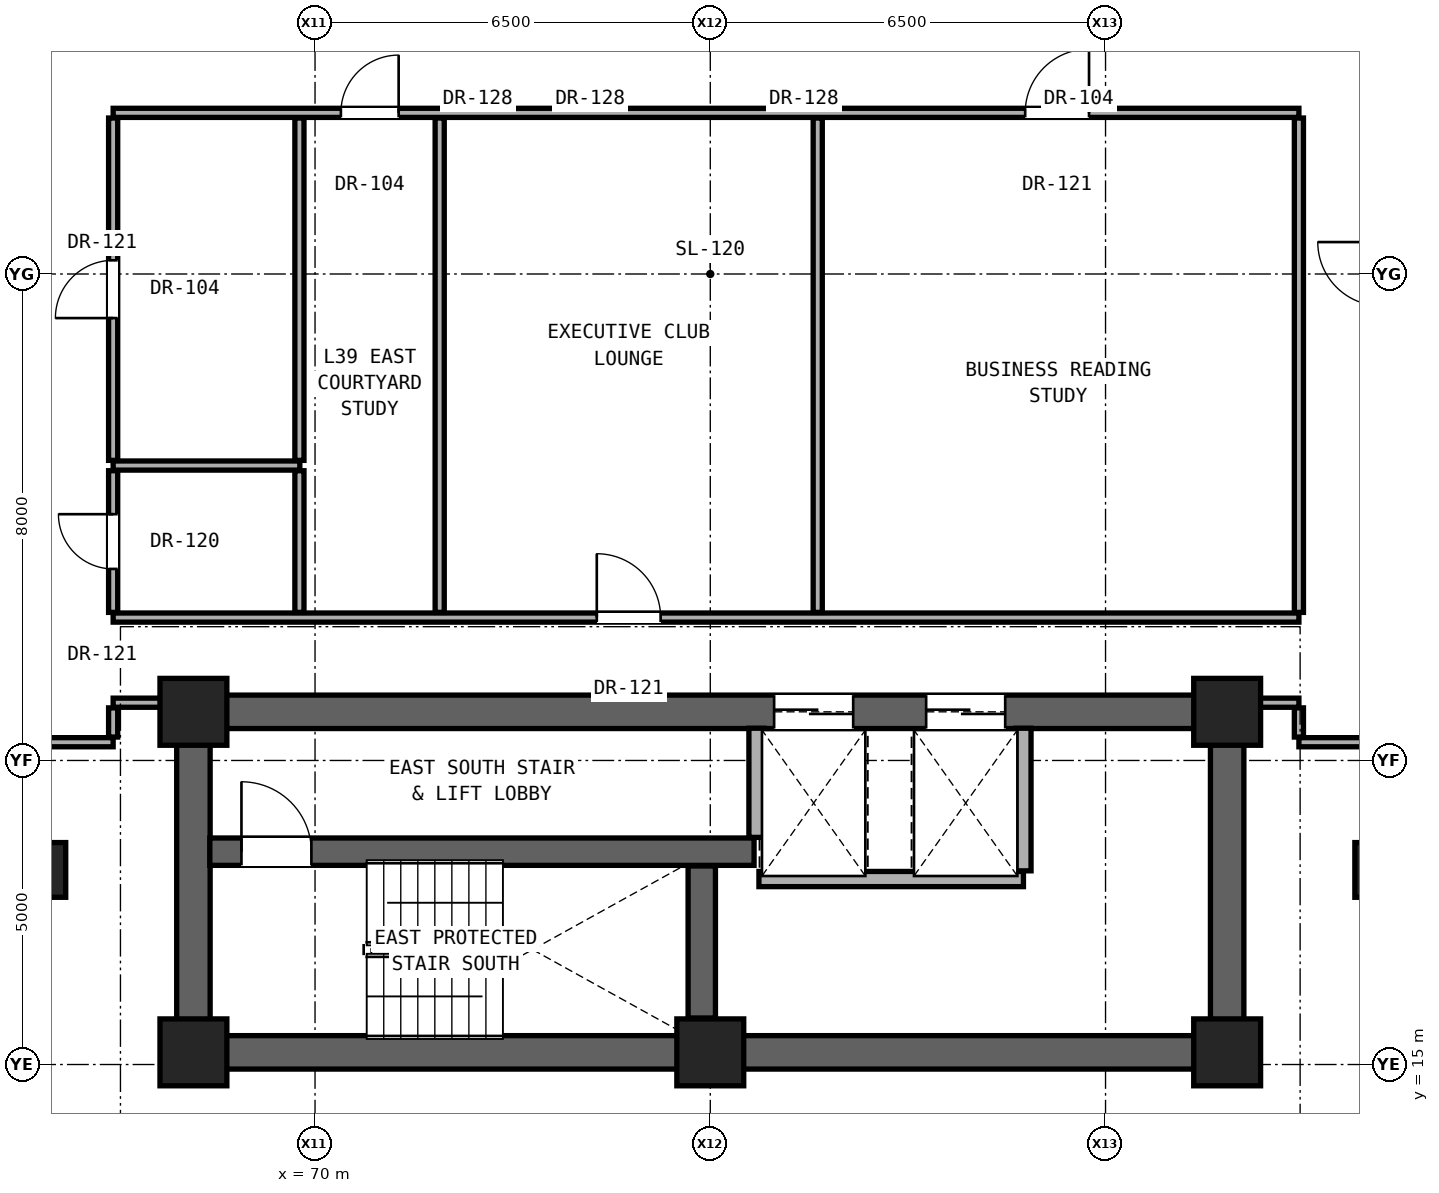
"""IFC4 building model, lengths in metres.
Left out: names, types, materials, properties, quantities, classifications, styles, units other than length and angle.
Written with IfcOpenShell. Run it as: python <this file> out.ifc"""

import sys

from ifc_helpers import new_model, si_unit, direction, frame, frame_2d, origin, origin_2d, place, context, subcontext, project, spatial, rectangle, extrude, element, fill, save


model = new_model("IFC4")
c1 = context("Model", 3, precision=1e-05, world=origin(), true_north=direction((0.0, 1.0)))
c2 = subcontext(c1, "Body", "Model", "MODEL_VIEW")
j1 = project(units=[si_unit("LENGTHUNIT", "METRE"), si_unit("PLANEANGLEUNIT", "RADIAN")], contexts=[c1])
p1 = place(None, origin())
s1 = spatial("IfcSite", under=j1, at=p1, CompositionType="ELEMENT")
p2 = place(p1, origin())
s2 = spatial("IfcBuilding", under=s1, at=p2, CompositionType="ELEMENT")
p3 = place(p2, frame((0.0, 0.0, 137.9)))
s3 = spatial("IfcBuildingStorey", under=s2, at=p3, CompositionType="ELEMENT", Elevation=137.9)
for number, where, z_axis, x_axis in (
    (1, (68.0, 15.2, 0.0), (0.0, 0.0, 1.0), (1.0, 0.0, 0.0)),
    (2, (76.5, 15.2, 0.0), (0.0, 0.0, 1.0), (1.0, 0.0, 0.0)),
    (3, (85.0, 15.2, 0.0), (0.0, 0.0, 1.0), (1.0, 0.0, 0.0)),
    (4, (68.0, 20.8, 0.0), (0.0, 0.0, 1.0), (1.0, 0.0, 0.0)),
    (5, (85.0, 20.8, 0.0), (0.0, 0.0, 1.0), (1.0, 0.0, 0.0)),
):
    element("IfcColumn", number, at=place(p3, frame(where, z_axis=z_axis, x_axis=x_axis)), inside=s3, PredefinedType="COLUMN", context=c2, shape_type="SweptSolid", body=[
        extrude(rectangle(XDim=1.1, YDim=1.1, at=origin_2d()), origin(), (0.0, 0.0, 1.0), 3.3),
    ])
for number, where, z_axis, x_axis in (
    (6, (65.6, 18.2, 0.0), (0.0, 0.0, 1.0), (1.0, 0.0, 0.0)),
    (7, (87.4, 18.2, 0.0), (0.0, 0.0, 1.0), (1.0, 0.0, 0.0)),
):
    element("IfcColumn", number, at=place(p3, frame(where, z_axis=z_axis, x_axis=x_axis)), inside=s3, PredefinedType="PILASTER", context=c2, shape_type="SweptSolid", body=[
        extrude(rectangle(XDim=0.6, YDim=0.9, at=origin_2d()), origin(), (0.0, 0.0, 1.0), 3.3),
    ])
p4 = place(p3, frame((68.0, 15.2, 0.0), z_axis=(0.0, 0.0, 1.0), x_axis=(1.0, 0.0, 0.0)))
e8 = element("IfcWall", 8, at=p4, inside=s3, PredefinedType="SHEAR", context=c2, shape_type="SweptSolid", body=[
    extrude(rectangle(XDim=17.0, YDim=0.55, at=frame_2d((8.5, 0.0))), origin(), (0.0, 0.0, 1.0), 3.08),
])
for number, where, z_axis, x_axis in (
    (9, (68.0, 15.2, 0.0), (0.0, 0.0, 1.0), (0.0, 1.0, 0.0)),
    (10, (85.0, 15.2, 0.0), (0.0, 0.0, 1.0), (0.0, 1.0, 0.0)),
):
    element("IfcWall", number, at=place(p3, frame(where, z_axis=z_axis, x_axis=x_axis)), inside=s3, PredefinedType="SHEAR", context=c2, shape_type="SweptSolid", body=[
        extrude(rectangle(XDim=5.6, YDim=0.55, at=frame_2d((2.8, 0.0))), origin(), (0.0, 0.0, 1.0), 3.08),
    ])
p5 = place(p3, frame((68.0, 20.8, 0.0), z_axis=(0.0, 0.0, 1.0), x_axis=(1.0, 0.0, 0.0)))
e11 = element("IfcWall", 11, at=p5, inside=s3, PredefinedType="SHEAR", context=c2, shape_type="SweptSolid", body=[
    extrude(rectangle(XDim=17.0, YDim=0.55, at=frame_2d((8.5, 0.0))), origin(), (0.0, 0.0, 1.0), 3.08),
])
p6 = place(p5, frame((9.55, 0.0, 0.0)))
e12 = element("IfcOpeningElement", 12, at=p6, cuts=e11, PredefinedType="OPENING", context=c2, shape_type="SweptSolid", body=[
    extrude(rectangle(XDim=1.3, YDim=2.3, at=frame_2d((0.65, 1.15))), frame((0.0, 0.285, 0.0), z_axis=(0.0, -1.0, 0.0), x_axis=(1.0, 0.0, 0.0)), (0.0, 0.0, 1.0), 0.57),
])
p7 = place(p5, frame((12.05, 0.0, 0.0)))
e13 = element("IfcOpeningElement", 13, at=p7, cuts=e11, PredefinedType="OPENING", context=c2, shape_type="SweptSolid", body=[
    extrude(rectangle(XDim=1.3, YDim=2.3, at=frame_2d((0.65, 1.15))), frame((0.0, 0.285, 0.0), z_axis=(0.0, -1.0, 0.0), x_axis=(1.0, 0.0, 0.0)), (0.0, 0.0, 1.0), 0.57),
])
p8 = place(p3, frame((77.3, 18.05, 0.0), z_axis=(0.0, 0.0, 1.0), x_axis=(1.0, 0.0, 0.0)))
e14 = element("IfcWall", 14, at=p8, inside=s3, PredefinedType="SOLIDWALL", context=c2, shape_type="SweptSolid", body=[
    extrude(rectangle(XDim=4.35, YDim=0.25, at=frame_2d((2.175, 0.0))), origin(), (0.0, 0.0, 1.0), 3.08),
])
p9 = place(p3, frame((68.27, 18.5, 0.0), z_axis=(0.0, 0.0, 1.0), x_axis=(1.0, 0.0, 0.0)))
e15 = element("IfcWall", 15, at=p9, inside=s3, PredefinedType="SHEAR", context=c2, shape_type="SweptSolid", body=[
    extrude(rectangle(XDim=8.95, YDim=0.45, at=frame_2d((4.475, 0.0))), origin(), (0.0, 0.0, 1.0), 3.08),
])
p10 = place(p9, frame((0.52, 0.0, 0.0)))
e16 = element("IfcOpeningElement", 16, at=p10, cuts=e15, PredefinedType="OPENING", context=c2, shape_type="SweptSolid", body=[
    extrude(rectangle(XDim=1.15, YDim=2.2, at=frame_2d((0.575, 1.1))), frame((0.0, 0.235, 0.0), z_axis=(0.0, -1.0, 0.0), x_axis=(1.0, 0.0, 0.0)), (0.0, 0.0, 1.0), 0.47),
])
p11 = place(p3, frame((65.32, 20.3, 0.0), z_axis=(0.0, 0.0, 1.0), x_axis=(1.0, 0.0, 0.0)))
e17 = element("IfcWall", 17, at=p11, inside=s3, PredefinedType="PARTITIONING", context=c2, shape_type="SweptSolid", body=[
    extrude(rectangle(XDim=1.36, YDim=0.15, at=frame_2d((0.68, 0.0))), origin(), (0.0, 0.0, 1.0), 3.08),
])
p12 = place(p3, frame((86.18, 20.3, 0.0), z_axis=(0.0, 0.0, 1.0), x_axis=(1.0, 0.0, 0.0)))
e18 = element("IfcWall", 18, at=p12, inside=s3, PredefinedType="PARTITIONING", context=c2, shape_type="SweptSolid", body=[
    extrude(rectangle(XDim=1.36, YDim=0.15, at=frame_2d((0.68, 0.0))), origin(), (0.0, 0.0, 1.0), 3.08),
])
p13 = place(p3, frame((66.68, 20.95, 0.0), z_axis=(0.0, 0.0, 1.0), x_axis=(1.0, 0.0, 0.0)))
e19 = element("IfcWall", 19, at=p13, inside=s3, PredefinedType="PARTITIONING", context=c2, shape_type="SweptSolid", body=[
    extrude(rectangle(XDim=1.05, YDim=0.15, at=frame_2d((0.525, 0.0))), origin(), (0.0, 0.0, 1.0), 2.472),
])
p14 = place(p3, frame((85.27, 20.95, 0.0), z_axis=(0.0, 0.0, 1.0), x_axis=(1.0, 0.0, 0.0)))
e20 = element("IfcWall", 20, at=p14, inside=s3, PredefinedType="PARTITIONING", context=c2, shape_type="SweptSolid", body=[
    extrude(rectangle(XDim=0.91, YDim=0.15, at=frame_2d((0.455, 0.0))), origin(), (0.0, 0.0, 1.0), 2.472),
])
p15 = place(p3, frame((66.68, 22.35, 0.0), z_axis=(0.0, 0.0, 1.0), x_axis=(1.0, 0.0, 0.0)))
e21 = element("IfcWall", 21, at=p15, inside=s3, PredefinedType="PARTITIONING", context=c2, shape_type="SweptSolid", body=[
    extrude(rectangle(XDim=19.5, YDim=0.15, at=frame_2d((9.75, 0.0))), origin(), (0.0, 0.0, 1.0), 2.216),
])
p16 = place(p15, frame((7.954, 0.0, 0.0)))
e22 = element("IfcOpeningElement", 22, at=p16, cuts=e21, PredefinedType="OPENING", context=c2, shape_type="SweptSolid", body=[
    extrude(rectangle(XDim=1.05, YDim=2.2, at=frame_2d((0.525, 1.1))), frame((0.0, 0.085, 0.0), z_axis=(0.0, -1.0, 0.0), x_axis=(1.0, 0.0, 0.0)), (0.0, 0.0, 1.0), 0.17),
])
p17 = place(p3, frame((66.68, 24.85, 0.0), z_axis=(0.0, 0.0, 1.0), x_axis=(1.0, 0.0, 0.0)))
e23 = element("IfcWall", 23, at=p17, inside=s3, PredefinedType="PARTITIONING", context=c2, shape_type="SweptSolid", body=[
    extrude(rectangle(XDim=3.07, YDim=0.15, at=frame_2d((1.535, 0.0))), origin(), (0.0, 0.0, 1.0), 2.216),
])
p18 = place(p3, frame((66.68, 30.65, 0.0), z_axis=(0.0, 0.0, 1.0), x_axis=(1.0, 0.0, 0.0)))
e24 = element("IfcWall", 24, at=p18, inside=s3, PredefinedType="PARTITIONING", context=c2, shape_type="SweptSolid", body=[
    extrude(rectangle(XDim=19.5, YDim=0.15, at=frame_2d((9.75, 0.0))), origin(), (0.0, 0.0, 1.0), 2.216),
])
p19 = place(p18, frame((3.745, 0.0, 0.0)))
e25 = element("IfcOpeningElement", 25, at=p19, cuts=e24, PredefinedType="OPENING", context=c2, shape_type="SweptSolid", body=[
    extrude(rectangle(XDim=0.95, YDim=2.15, at=frame_2d((0.475, 1.075))), frame((0.0, 0.085, 0.0), z_axis=(0.0, -1.0, 0.0), x_axis=(1.0, 0.0, 0.0)), (0.0, 0.0, 1.0), 0.17),
])
p20 = place(p18, frame((14.999, 0.0, 0.0)))
e26 = element("IfcOpeningElement", 26, at=p20, cuts=e24, PredefinedType="OPENING", context=c2, shape_type="SweptSolid", body=[
    extrude(rectangle(XDim=1.05, YDim=2.2, at=frame_2d((0.525, 1.1))), frame((0.0, 0.085, 0.0), z_axis=(0.0, -1.0, 0.0), x_axis=(1.0, 0.0, 0.0)), (0.0, 0.0, 1.0), 0.17),
])
p21 = place(p3, frame((66.68, 20.385, 0.0), z_axis=(0.0, 0.0, 1.0), x_axis=(0.0, 1.0, 0.0)))
e27 = element("IfcWall", 27, at=p21, inside=s3, PredefinedType="PARTITIONING", context=c2, shape_type="SweptSolid", body=[
    extrude(rectangle(XDim=0.48, YDim=0.15, at=frame_2d((0.24, 0.0))), origin(), (0.0, 0.0, 1.0), 2.472),
])
p22 = place(p3, frame((66.68, 22.435, 0.0), z_axis=(0.0, 0.0, 1.0), x_axis=(0.0, 1.0, 0.0)))
e28 = element("IfcWall", 28, at=p22, inside=s3, PredefinedType="PARTITIONING", context=c2, shape_type="SweptSolid", body=[
    extrude(rectangle(XDim=2.33, YDim=0.15, at=frame_2d((1.165, 0.0))), origin(), (0.0, 0.0, 1.0), 3.08),
])
p23 = place(p22, frame((0.715, 0.0, 0.0)))
e29 = element("IfcOpeningElement", 29, at=p23, cuts=e28, PredefinedType="OPENING", context=c2, shape_type="SweptSolid", body=[
    extrude(rectangle(XDim=0.9, YDim=2.1, at=frame_2d((0.45, 1.05))), frame((0.0, 0.085, 0.0), z_axis=(0.0, -1.0, 0.0), x_axis=(1.0, 0.0, 0.0)), (0.0, 0.0, 1.0), 0.17),
])
p24 = place(p3, frame((66.68, 24.935, 0.0), z_axis=(0.0, 0.0, 1.0), x_axis=(0.0, 1.0, 0.0)))
e30 = element("IfcWall", 30, at=p24, inside=s3, PredefinedType="PARTITIONING", context=c2, shape_type="SweptSolid", body=[
    extrude(rectangle(XDim=5.63, YDim=0.15, at=frame_2d((2.815, 0.0))), origin(), (0.0, 0.0, 1.0), 2.376),
])
p25 = place(p24, frame((2.34, 0.0, 0.0)))
e31 = element("IfcOpeningElement", 31, at=p25, cuts=e30, PredefinedType="OPENING", context=c2, shape_type="SweptSolid", body=[
    extrude(rectangle(XDim=0.95, YDim=2.15, at=frame_2d((0.475, 1.075))), frame((0.0, 0.085, 0.0), z_axis=(0.0, -1.0, 0.0), x_axis=(1.0, 0.0, 0.0)), (0.0, 0.0, 1.0), 0.17),
])
p26 = place(p3, frame((69.743, 22.435, 0.0), z_axis=(0.0, 0.0, 1.0), x_axis=(0.0, 1.0, 0.0)))
e32 = element("IfcWall", 32, at=p26, inside=s3, PredefinedType="PARTITIONING", context=c2, shape_type="SweptSolid", body=[
    extrude(rectangle(XDim=2.33, YDim=0.15, at=frame_2d((1.165, 0.0))), origin(), (0.0, 0.0, 1.0), 3.08),
])
p27 = place(p3, frame((69.743, 24.935, 0.0), z_axis=(0.0, 0.0, 1.0), x_axis=(0.0, 1.0, 0.0)))
e33 = element("IfcWall", 33, at=p27, inside=s3, PredefinedType="PARTITIONING", context=c2, shape_type="SweptSolid", body=[
    extrude(rectangle(XDim=5.63, YDim=0.15, at=frame_2d((2.815, 0.0))), origin(), (0.0, 0.0, 1.0), 2.216),
])
p28 = place(p3, frame((72.05, 22.435, 0.0), z_axis=(0.0, 0.0, 1.0), x_axis=(0.0, 1.0, 0.0)))
e34 = element("IfcWall", 34, at=p28, inside=s3, PredefinedType="PARTITIONING", context=c2, shape_type="SweptSolid", body=[
    extrude(rectangle(XDim=8.13, YDim=0.15, at=frame_2d((4.065, 0.0))), origin(), (0.0, 0.0, 1.0), 2.216),
])
p29 = place(p3, frame((76.36, 15.765, 0.0), z_axis=(0.0, 0.0, 1.0), x_axis=(0.0, 1.0, 0.0)))
e35 = element("IfcWall", 35, at=p29, inside=s3, PredefinedType="SHEAR", context=c2, shape_type="SweptSolid", body=[
    extrude(rectangle(XDim=2.5, YDim=0.45, at=frame_2d((1.25, 0.0))), origin(), (0.0, 0.0, 1.0), 3.08),
])
p30 = place(p3, frame((77.26, 18.735, 0.0), z_axis=(0.0, 0.0, 1.0), x_axis=(0.0, 1.0, 0.0)))
e36 = element("IfcWall", 36, at=p30, inside=s3, PredefinedType="SOLIDWALL", context=c2, shape_type="SweptSolid", body=[
    extrude(rectangle(XDim=1.795, YDim=0.25, at=frame_2d((0.897, 0.0))), origin(), (0.0, 0.0, 1.0), 3.08),
])
p31 = place(p3, frame((78.267, 22.435, 0.0), z_axis=(0.0, 0.0, 1.0), x_axis=(0.0, 1.0, 0.0)))
e37 = element("IfcWall", 37, at=p31, inside=s3, PredefinedType="PARTITIONING", context=c2, shape_type="SweptSolid", body=[
    extrude(rectangle(XDim=8.13, YDim=0.15, at=frame_2d((4.065, 0.0))), origin(), (0.0, 0.0, 1.0), 2.216),
])
p32 = place(p3, frame((81.65, 18.185, 0.0), z_axis=(0.0, 0.0, 1.0), x_axis=(0.0, 1.0, 0.0)))
e38 = element("IfcWall", 38, at=p32, inside=s3, PredefinedType="SOLIDWALL", context=c2, shape_type="SweptSolid", body=[
    extrude(rectangle(XDim=2.345, YDim=0.25, at=frame_2d((1.172, 0.0))), origin(), (0.0, 0.0, 1.0), 3.08),
])
p33 = place(p3, frame((86.18, 20.385, 0.0), z_axis=(0.0, 0.0, 1.0), x_axis=(0.0, 1.0, 0.0)))
e39 = element("IfcWall", 39, at=p33, inside=s3, PredefinedType="PARTITIONING", context=c2, shape_type="SweptSolid", body=[
    extrude(rectangle(XDim=0.48, YDim=0.15, at=frame_2d((0.24, 0.0))), origin(), (0.0, 0.0, 1.0), 2.472),
])
p34 = place(p3, frame((86.18, 22.435, 0.0), z_axis=(0.0, 0.0, 1.0), x_axis=(0.0, 1.0, 0.0)))
e40 = element("IfcWall", 40, at=p34, inside=s3, PredefinedType="PARTITIONING", context=c2, shape_type="SweptSolid", body=[
    extrude(rectangle(XDim=8.13, YDim=0.15, at=frame_2d((4.065, 0.0))), origin(), (0.0, 0.0, 1.0), 2.376),
])
p35 = place(p10, origin())
e41 = element("IfcDoor", 41, at=p35, inside=s3, OperationType="SINGLE_SWING_LEFT", PredefinedType="DOOR", context=c2, shape_type="SweptSolid", body=[
    extrude(rectangle(XDim=1.15, YDim=2.2, at=frame_2d((0.575, 1.1))), frame((0.0, 0.025, 0.0), z_axis=(0.0, -1.0, 0.0), x_axis=(1.0, 0.0, 0.0)), (0.0, 0.0, 1.0), 0.05),
])
fill(e16, e41)
p36 = place(p23, origin())
e42 = element("IfcDoor", 42, at=p36, inside=s3, OperationType="SINGLE_SWING_RIGHT", PredefinedType="DOOR", context=c2, shape_type="SweptSolid", body=[
    extrude(rectangle(XDim=0.9, YDim=2.1, at=frame_2d((0.45, 1.05))), frame((0.0, 0.025, 0.0), z_axis=(0.0, -1.0, 0.0), x_axis=(1.0, 0.0, 0.0)), (0.0, 0.0, 1.0), 0.05),
])
fill(e29, e42)
p37 = place(p25, origin())
e43 = element("IfcDoor", 43, at=p37, inside=s3, OperationType="SINGLE_SWING_LEFT", PredefinedType="DOOR", context=c2, shape_type="SweptSolid", body=[
    extrude(rectangle(XDim=0.95, YDim=2.15, at=frame_2d((0.475, 1.075))), frame((0.0, 0.025, 0.0), z_axis=(0.0, -1.0, 0.0), x_axis=(1.0, 0.0, 0.0)), (0.0, 0.0, 1.0), 0.05),
])
fill(e31, e43)
p38 = place(p19, origin())
e44 = element("IfcDoor", 44, at=p38, inside=s3, OperationType="SINGLE_SWING_RIGHT", PredefinedType="DOOR", context=c2, shape_type="SweptSolid", body=[
    extrude(rectangle(XDim=0.95, YDim=2.15, at=frame_2d((0.475, 1.075))), frame((0.0, 0.025, 0.0), z_axis=(0.0, -1.0, 0.0), x_axis=(1.0, 0.0, 0.0)), (0.0, 0.0, 1.0), 0.05),
])
fill(e25, e44)
p39 = place(p16, origin())
e45 = element("IfcDoor", 45, at=p39, inside=s3, OperationType="SINGLE_SWING_LEFT", PredefinedType="DOOR", context=c2, shape_type="SweptSolid", body=[
    extrude(rectangle(XDim=1.05, YDim=2.2, at=frame_2d((0.525, 1.1))), frame((0.0, 0.025, 0.0), z_axis=(0.0, -1.0, 0.0), x_axis=(1.0, 0.0, 0.0)), (0.0, 0.0, 1.0), 0.05),
])
fill(e22, e45)
p40 = place(p20, origin())
e46 = element("IfcDoor", 46, at=p40, inside=s3, OperationType="SINGLE_SWING_RIGHT", PredefinedType="DOOR", context=c2, shape_type="SweptSolid", body=[
    extrude(rectangle(XDim=1.05, YDim=2.2, at=frame_2d((0.525, 1.1))), frame((0.0, 0.025, 0.0), z_axis=(0.0, -1.0, 0.0), x_axis=(1.0, 0.0, 0.0)), (0.0, 0.0, 1.0), 0.05),
])
fill(e26, e46)
p41 = place(p6, origin())
e47 = element("IfcDoor", 47, at=p41, inside=s3, OperationType="DOUBLE_DOOR_SLIDING", PredefinedType="DOOR", context=c2, shape_type="SweptSolid", body=[
    extrude(rectangle(XDim=1.3, YDim=2.3, at=frame_2d((0.65, 1.15))), frame((0.0, 0.025, 0.0), z_axis=(0.0, -1.0, 0.0), x_axis=(1.0, 0.0, 0.0)), (0.0, 0.0, 1.0), 0.05),
])
fill(e12, e47)
p42 = place(p7, origin())
e48 = element("IfcDoor", 48, at=p42, inside=s3, OperationType="DOUBLE_DOOR_SLIDING", PredefinedType="DOOR", context=c2, shape_type="SweptSolid", body=[
    extrude(rectangle(XDim=1.3, YDim=2.3, at=frame_2d((0.65, 1.15))), frame((0.0, 0.025, 0.0), z_axis=(0.0, -1.0, 0.0), x_axis=(1.0, 0.0, 0.0)), (0.0, 0.0, 1.0), 0.05),
])
fill(e13, e48)
save(model, sys.argv[1])
